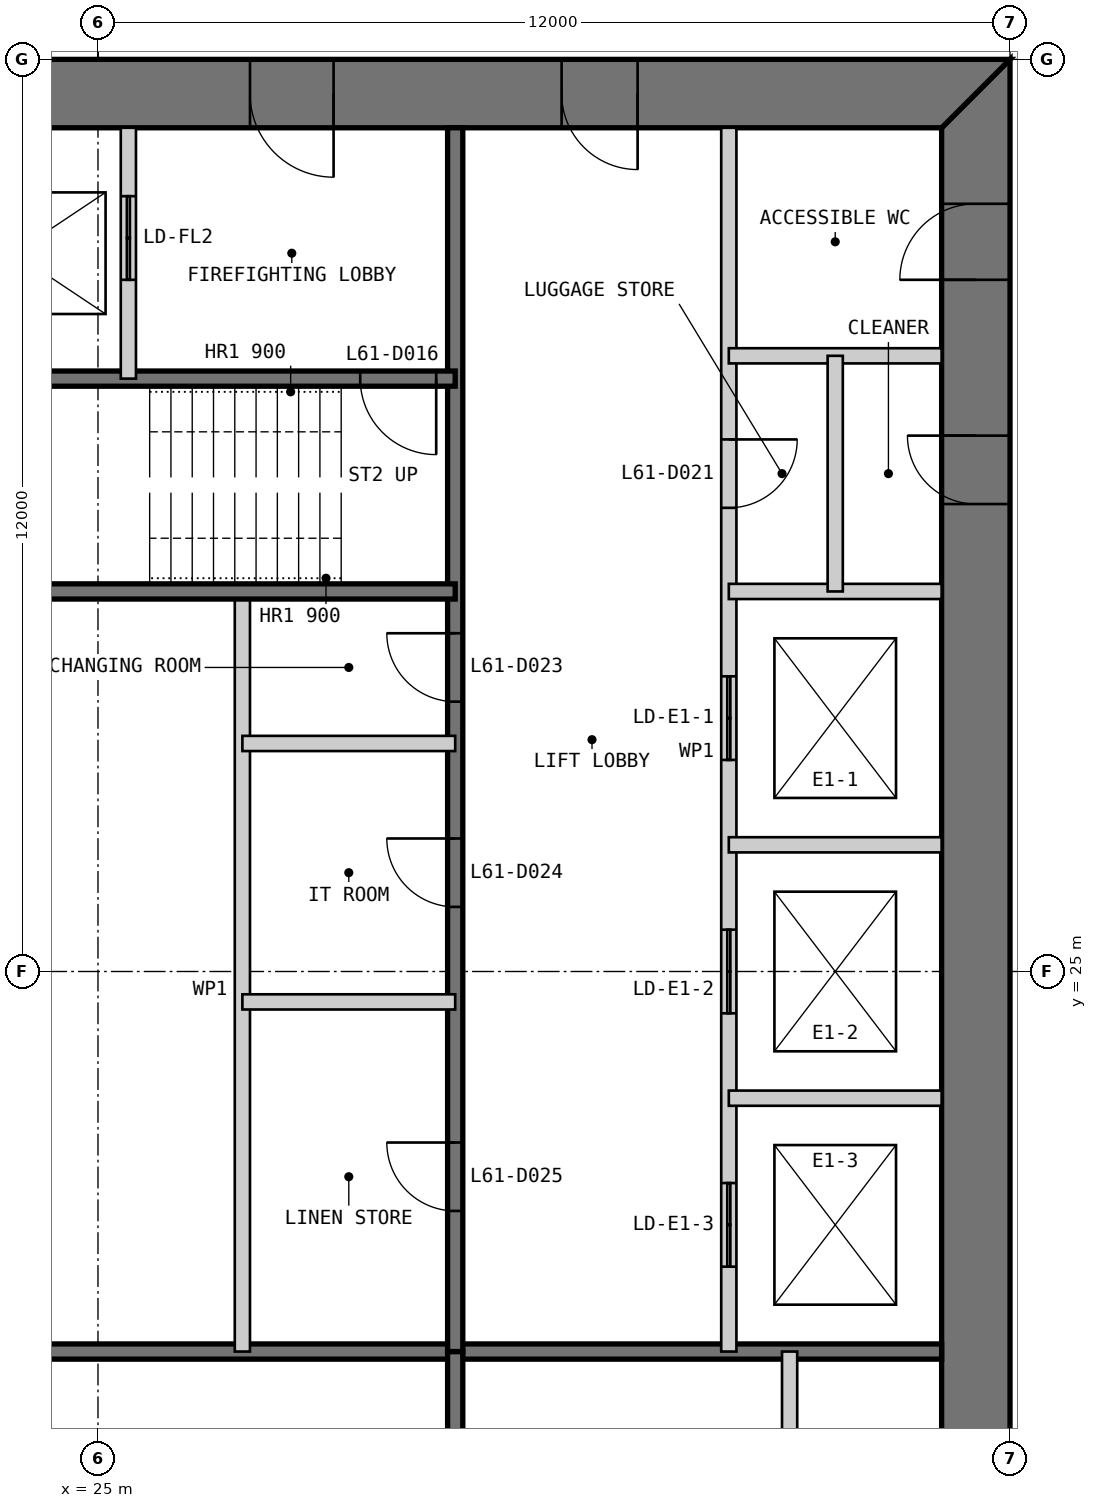
"""IFC4 building model, lengths in metres.
Left out: names, types, materials, properties, quantities, classifications, styles, units other than length and angle.
Written with IfcOpenShell. Run it as: python <this file> out.ifc"""

import sys

from ifc_helpers import new_model, si_unit, direction, frame, frame_2d, origin, place, context, subcontext, project, spatial, polyline, rectangle, outline, extrude, element, fill, save


model = new_model("IFC4")
c1 = context("Model", 3, precision=1e-05, world=origin(), true_north=direction((0.0, 1.0)))
c2 = subcontext(c1, "Body", "Model", "MODEL_VIEW")
j1 = project(units=[si_unit("LENGTHUNIT", "METRE"), si_unit("PLANEANGLEUNIT", "RADIAN")], contexts=[c1])
p1 = place(None, origin())
s1 = spatial("IfcSite", under=j1, at=p1, CompositionType="ELEMENT")
p2 = place(p1, origin())
s2 = spatial("IfcBuilding", under=s1, at=p2, CompositionType="ELEMENT")
p3 = place(p2, frame((0.0, 0.0, 259.4)))
s3 = spatial("IfcBuildingStorey", under=s2, at=p3, CompositionType="ELEMENT", Elevation=259.4)
p4 = place(p3, frame((36.55, 13.9, 0.0), z_axis=(0.0, 0.0, 1.0), x_axis=(0.0, 1.0, 0.0)))
e1 = element("IfcWall", 1, at=p4, inside=s3, PredefinedType="SHEAR", context=c2, shape_type="SweptSolid", body=[
    extrude(outline(polyline([(-0.9, -0.45), (23.1, -0.45), (22.2, 0.45), (0.0, 0.45), (-0.9, -0.45)])), origin(), (0.0, 0.0, 1.0), 3.4),
])
p5 = place(p4, frame((20.2, 0.0, 0.0)))
e2 = element("IfcOpeningElement", 2, at=p5, cuts=e1, PredefinedType="OPENING", context=c2, shape_type="SweptSolid", body=[
    extrude(rectangle(XDim=1.0, YDim=2.2, at=frame_2d((0.5, 1.1))), frame((0.0, 0.46, 0.0), z_axis=(0.0, -1.0, 0.0), x_axis=(1.0, 0.0, 0.0)), (0.0, 0.0, 1.0), 0.92),
])
p6 = place(p4, frame((17.25, 0.0, 0.0)))
e3 = element("IfcOpeningElement", 3, at=p6, cuts=e1, PredefinedType="OPENING", context=c2, shape_type="SweptSolid", body=[
    extrude(rectangle(XDim=0.9, YDim=2.2, at=frame_2d((0.45, 1.1))), frame((0.0, 0.46, 0.0), z_axis=(0.0, -1.0, 0.0), x_axis=(1.0, 0.0, 0.0)), (0.0, 0.0, 1.0), 0.92),
])
p7 = place(p3, frame((37.0, 36.55, 0.0), z_axis=(0.0, 0.0, 1.0), x_axis=(-1.0, 0.0, 0.0)))
e4 = element("IfcWall", 4, at=p7, inside=s3, PredefinedType="SHEAR", context=c2, shape_type="SweptSolid", body=[
    extrude(outline(polyline([(0.0, -0.45), (24.0, -0.45), (23.1, 0.45), (0.9, 0.45), (0.0, -0.45)])), origin(), (0.0, 0.0, 1.0), 3.4),
])
p8 = place(p7, frame((4.9, 0.0, 0.0)))
e5 = element("IfcOpeningElement", 5, at=p8, cuts=e4, PredefinedType="OPENING", context=c2, shape_type="SweptSolid", body=[
    extrude(rectangle(XDim=1.0, YDim=2.2, at=frame_2d((0.5, 1.1))), frame((0.0, 0.46, 0.0), z_axis=(0.0, -1.0, 0.0), x_axis=(1.0, 0.0, 0.0)), (0.0, 0.0, 1.0), 0.92),
])
p9 = place(p7, frame((8.9, 0.0, 0.0)))
e6 = element("IfcOpeningElement", 6, at=p9, cuts=e4, PredefinedType="OPENING", context=c2, shape_type="SweptSolid", body=[
    extrude(rectangle(XDim=1.1, YDim=2.2, at=frame_2d((0.55, 1.1))), frame((0.0, 0.46, 0.0), z_axis=(0.0, -1.0, 0.0), x_axis=(1.0, 0.0, 0.0)), (0.0, 0.0, 1.0), 0.92),
])
p10 = place(p7, frame((15.05, 0.0, 0.0)))
e7 = element("IfcOpeningElement", 7, at=p10, cuts=e4, PredefinedType="OPENING", context=c2, shape_type="SweptSolid", body=[
    extrude(rectangle(XDim=0.9, YDim=2.2, at=frame_2d((0.45, 1.1))), frame((0.0, 0.46, 0.0), z_axis=(0.0, -1.0, 0.0), x_axis=(1.0, 0.0, 0.0)), (0.0, 0.0, 1.0), 0.92),
])
p11 = place(p7, frame((17.9, 0.0, 0.0)))
e8 = element("IfcOpeningElement", 8, at=p11, cuts=e4, PredefinedType="OPENING", context=c2, shape_type="SweptSolid", body=[
    extrude(rectangle(XDim=1.0, YDim=2.2, at=frame_2d((0.5, 1.1))), frame((0.0, 0.46, 0.0), z_axis=(0.0, -1.0, 0.0), x_axis=(1.0, 0.0, 0.0)), (0.0, 0.0, 1.0), 0.92),
])
p12 = place(p7, frame((21.4, 0.0, 0.0)))
e9 = element("IfcOpeningElement", 9, at=p12, cuts=e4, PredefinedType="OPENING", context=c2, shape_type="SweptSolid", body=[
    extrude(rectangle(XDim=1.0, YDim=2.2, at=frame_2d((0.5, 1.1))), frame((0.0, 0.46, 0.0), z_axis=(0.0, -1.0, 0.0), x_axis=(1.0, 0.0, 0.0)), (0.0, 0.0, 1.0), 0.92),
])
p13 = place(p3, frame((20.3, 20.0, 0.0), z_axis=(0.0, 0.0, 1.0), x_axis=(1.0, 0.0, 0.0)))
e10 = element("IfcWall", 10, at=p13, inside=s3, PredefinedType="SOLIDWALL", context=c2, shape_type="SweptSolid", body=[
    extrude(rectangle(XDim=15.8, YDim=0.2, at=frame_2d((7.9, 0.0))), origin(), (0.0, 0.0, 1.0), 3.2),
])
p14 = place(p3, frame((29.7, 13.9, 0.0), z_axis=(0.0, 0.0, 1.0), x_axis=(0.0, 1.0, 0.0)))
e11 = element("IfcWall", 11, at=p14, inside=s3, PredefinedType="SOLIDWALL", context=c2, shape_type="SweptSolid", body=[
    extrude(rectangle(XDim=6.1, YDim=0.2, at=frame_2d((3.05, 0.0))), origin(), (0.0, 0.0, 1.0), 3.2),
])
p15 = place(p3, frame((34.1, 13.9, 0.0), z_axis=(0.0, 0.0, 1.0), x_axis=(0.0, 1.0, 0.0)))
e12 = element("IfcWall", 12, at=p15, inside=s3, PredefinedType="PARTITIONING", context=c2, shape_type="SweptSolid", body=[
    extrude(rectangle(XDim=6.1, YDim=0.2, at=frame_2d((3.05, 0.0))), origin(), (0.0, 0.0, 1.0), 3.2),
])
p16 = place(p3, frame((33.3, 36.1, 0.0), z_axis=(0.0, 0.0, 1.0), x_axis=(0.0, -1.0, 0.0)))
e13 = element("IfcWall", 13, at=p16, inside=s3, PredefinedType="PARTITIONING", context=c2, shape_type="SweptSolid", body=[
    extrude(rectangle(XDim=16.1, YDim=0.2, at=frame_2d((8.05, 0.0))), origin(), (0.0, 0.0, 1.0), 3.2),
])
p17 = place(p16, frame((4.1, 0.0, 0.0)))
e14 = element("IfcOpeningElement", 14, at=p17, cuts=e13, PredefinedType="OPENING", context=c2, shape_type="SweptSolid", body=[
    extrude(rectangle(XDim=0.9, YDim=2.2, at=frame_2d((0.45, 1.1))), frame((0.0, 0.11, 0.0), z_axis=(0.0, -1.0, 0.0), x_axis=(1.0, 0.0, 0.0)), (0.0, 0.0, 1.0), 0.22),
])
p18 = place(p16, frame((7.217, 0.0, 0.0)))
e15 = element("IfcOpeningElement", 15, at=p18, cuts=e13, PredefinedType="OPENING", context=c2, shape_type="SweptSolid", body=[
    extrude(rectangle(XDim=1.1, YDim=2.2, at=frame_2d((0.55, 1.1))), frame((0.0, 0.11, 0.0), z_axis=(0.0, -1.0, 0.0), x_axis=(1.0, 0.0, 0.0)), (0.0, 0.0, 1.0), 0.22),
])
p19 = place(p16, frame((10.55, 0.0, 0.0)))
e16 = element("IfcOpeningElement", 16, at=p19, cuts=e13, PredefinedType="OPENING", context=c2, shape_type="SweptSolid", body=[
    extrude(rectangle(XDim=1.1, YDim=2.2, at=frame_2d((0.55, 1.1))), frame((0.0, 0.11, 0.0), z_axis=(0.0, -1.0, 0.0), x_axis=(1.0, 0.0, 0.0)), (0.0, 0.0, 1.0), 0.22),
])
p20 = place(p16, frame((13.883, 0.0, 0.0)))
e17 = element("IfcOpeningElement", 17, at=p20, cuts=e13, PredefinedType="OPENING", context=c2, shape_type="SweptSolid", body=[
    extrude(rectangle(XDim=1.1, YDim=2.2, at=frame_2d((0.55, 1.1))), frame((0.0, 0.11, 0.0), z_axis=(0.0, -1.0, 0.0), x_axis=(1.0, 0.0, 0.0)), (0.0, 0.0, 1.0), 0.22),
])
p21 = place(p3, frame((29.7, 36.1, 0.0), z_axis=(0.0, 0.0, 1.0), x_axis=(0.0, -1.0, 0.0)))
e18 = element("IfcWall", 18, at=p21, inside=s3, PredefinedType="SOLIDWALL", context=c2, shape_type="SweptSolid", body=[
    extrude(rectangle(XDim=16.1, YDim=0.2, at=frame_2d((8.05, 0.0))), origin(), (0.0, 0.0, 1.0), 3.2),
])
p22 = place(p21, frame((6.65, 0.0, 0.0)))
e19 = element("IfcOpeningElement", 19, at=p22, cuts=e18, PredefinedType="OPENING", context=c2, shape_type="SweptSolid", body=[
    extrude(rectangle(XDim=0.9, YDim=2.2, at=frame_2d((0.45, 1.1))), frame((0.0, 0.11, 0.0), z_axis=(0.0, -1.0, 0.0), x_axis=(1.0, 0.0, 0.0)), (0.0, 0.0, 1.0), 0.22),
])
p23 = place(p21, frame((9.35, 0.0, 0.0)))
e20 = element("IfcOpeningElement", 20, at=p23, cuts=e18, PredefinedType="OPENING", context=c2, shape_type="SweptSolid", body=[
    extrude(rectangle(XDim=0.9, YDim=2.2, at=frame_2d((0.45, 1.1))), frame((0.0, 0.11, 0.0), z_axis=(0.0, -1.0, 0.0), x_axis=(1.0, 0.0, 0.0)), (0.0, 0.0, 1.0), 0.22),
])
p24 = place(p21, frame((13.35, 0.0, 0.0)))
e21 = element("IfcOpeningElement", 21, at=p24, cuts=e18, PredefinedType="OPENING", context=c2, shape_type="SweptSolid", body=[
    extrude(rectangle(XDim=0.9, YDim=2.2, at=frame_2d((0.45, 1.1))), frame((0.0, 0.11, 0.0), z_axis=(0.0, -1.0, 0.0), x_axis=(1.0, 0.0, 0.0)), (0.0, 0.0, 1.0), 0.22),
])
for number, where, z_axis, x_axis in (
    (22, (36.1, 30.0, 0.0), (0.0, 0.0, 1.0), (-1.0, 0.0, 0.0)),
    (23, (36.1, 26.667, 0.0), (0.0, 0.0, 1.0), (-1.0, 0.0, 0.0)),
    (24, (36.1, 23.333, 0.0), (0.0, 0.0, 1.0), (-1.0, 0.0, 0.0)),
):
    element("IfcWall", number, at=place(p3, frame(where, z_axis=z_axis, x_axis=x_axis)), inside=s3, PredefinedType="PARTITIONING", context=c2, shape_type="SweptSolid", body=[
        extrude(rectangle(XDim=2.8, YDim=0.2, at=frame_2d((1.4, 0.0))), origin(), (0.0, 0.0, 1.0), 3.2),
    ])
p25 = place(p3, frame((26.9, 30.0, 0.0), z_axis=(0.0, 0.0, 1.0), x_axis=(0.0, -1.0, 0.0)))
e25 = element("IfcWall", 25, at=p25, inside=s3, PredefinedType="PARTITIONING", context=c2, shape_type="SweptSolid", body=[
    extrude(rectangle(XDim=10.0, YDim=0.2, at=frame_2d((5.0, 0.0))), origin(), (0.0, 0.0, 1.0), 3.2),
])
p26 = place(p3, frame((29.7, 32.8, 0.0), z_axis=(0.0, 0.0, 1.0), x_axis=(-1.0, 0.0, 0.0)))
e26 = element("IfcWall", 26, at=p26, inside=s3, PredefinedType="SOLIDWALL", context=c2, shape_type="SweptSolid", body=[
    extrude(rectangle(XDim=9.4, YDim=0.2, at=frame_2d((4.7, 0.0))), origin(), (0.0, 0.0, 1.0), 3.2),
])
p27 = place(p26, frame((0.25, 0.0, 0.0)))
e27 = element("IfcOpeningElement", 27, at=p27, cuts=e26, PredefinedType="OPENING", context=c2, shape_type="SweptSolid", body=[
    extrude(rectangle(XDim=1.0, YDim=2.2, at=frame_2d((0.5, 1.1))), frame((0.0, 0.11, 0.0), z_axis=(0.0, -1.0, 0.0), x_axis=(1.0, 0.0, 0.0)), (0.0, 0.0, 1.0), 0.22),
])
p28 = place(p3, frame((29.7, 30.0, 0.0), z_axis=(0.0, 0.0, 1.0), x_axis=(-1.0, 0.0, 0.0)))
e28 = element("IfcWall", 28, at=p28, inside=s3, PredefinedType="SOLIDWALL", context=c2, shape_type="SweptSolid", body=[
    extrude(rectangle(XDim=15.8, YDim=0.2, at=frame_2d((7.9, 0.0))), origin(), (0.0, 0.0, 1.0), 3.2),
])
p29 = place(p3, frame((25.4, 36.1, 0.0), z_axis=(0.0, 0.0, 1.0), x_axis=(0.0, -1.0, 0.0)))
e29 = element("IfcWall", 29, at=p29, inside=s3, PredefinedType="PARTITIONING", context=c2, shape_type="SweptSolid", body=[
    extrude(rectangle(XDim=3.3, YDim=0.2, at=frame_2d((1.65, 0.0))), origin(), (0.0, 0.0, 1.0), 3.2),
])
p30 = place(p29, frame((0.9, 0.0, 0.0)))
e30 = element("IfcOpeningElement", 30, at=p30, cuts=e29, PredefinedType="OPENING", context=c2, shape_type="SweptSolid", body=[
    extrude(rectangle(XDim=1.1, YDim=2.2, at=frame_2d((0.55, 1.1))), frame((0.0, 0.11, 0.0), z_axis=(0.0, -1.0, 0.0), x_axis=(1.0, 0.0, 0.0)), (0.0, 0.0, 1.0), 0.22),
])
p31 = place(p3, frame((36.1, 33.1, 0.0), z_axis=(0.0, 0.0, 1.0), x_axis=(-1.0, 0.0, 0.0)))
e31 = element("IfcWall", 31, at=p31, inside=s3, PredefinedType="PARTITIONING", context=c2, shape_type="SweptSolid", body=[
    extrude(rectangle(XDim=2.8, YDim=0.2, at=frame_2d((1.4, 0.0))), origin(), (0.0, 0.0, 1.0), 3.2),
])
p32 = place(p3, frame((34.7, 33.1, 0.0), z_axis=(0.0, 0.0, 1.0), x_axis=(0.0, -1.0, 0.0)))
e32 = element("IfcWall", 32, at=p32, inside=s3, PredefinedType="PARTITIONING", context=c2, shape_type="SweptSolid", body=[
    extrude(rectangle(XDim=3.1, YDim=0.2, at=frame_2d((1.55, 0.0))), origin(), (0.0, 0.0, 1.0), 3.2),
])
for number, where, z_axis, x_axis in (
    (33, (29.7, 28.0, 0.0), (0.0, 0.0, 1.0), (-1.0, 0.0, 0.0)),
    (34, (29.7, 24.6, 0.0), (0.0, 0.0, 1.0), (-1.0, 0.0, 0.0)),
):
    element("IfcWall", number, at=place(p3, frame(where, z_axis=z_axis, x_axis=x_axis)), inside=s3, PredefinedType="PARTITIONING", context=c2, shape_type="SweptSolid", body=[
        extrude(rectangle(XDim=2.8, YDim=0.2, at=frame_2d((1.4, 0.0))), origin(), (0.0, 0.0, 1.0), 3.2),
    ])
p33 = place(p8, origin())
e35 = element("IfcDoor", 35, at=p33, inside=s3, OperationType="SINGLE_SWING_LEFT", PredefinedType="DOOR", context=c2, shape_type="SweptSolid", body=[
    extrude(rectangle(XDim=1.0, YDim=2.2, at=frame_2d((0.5, 1.1))), frame((0.0, 0.025, 0.0), z_axis=(0.0, -1.0, 0.0), x_axis=(1.0, 0.0, 0.0)), (0.0, 0.0, 1.0), 0.05),
    extrude(outline(polyline([(0.0, 0.0), (0.04, 0.0), (0.04, 2.16), (0.96, 2.16), (0.96, 0.0), (1.0, 0.0), (1.0, 2.2), (0.0, 2.2), (0.0, 0.0)])), frame((0.0, 0.3, 0.0), z_axis=(0.0, -1.0, 0.0), x_axis=(1.0, 0.0, 0.0)), (0.0, 0.0, 1.0), 0.6),
])
fill(e5, e35)
p34 = place(p9, origin())
e36 = element("IfcDoor", 36, at=p34, inside=s3, OperationType="SINGLE_SWING_LEFT", PredefinedType="DOOR", context=c2, shape_type="SweptSolid", body=[
    extrude(rectangle(XDim=1.1, YDim=2.2, at=frame_2d((0.55, 1.1))), frame((0.0, 0.025, 0.0), z_axis=(0.0, -1.0, 0.0), x_axis=(1.0, 0.0, 0.0)), (0.0, 0.0, 1.0), 0.05),
    extrude(outline(polyline([(0.0, 0.0), (0.04, 0.0), (0.04, 2.16), (1.06, 2.16), (1.06, 0.0), (1.1, 0.0), (1.1, 2.2), (0.0, 2.2), (0.0, 0.0)])), frame((0.0, 0.3, 0.0), z_axis=(0.0, -1.0, 0.0), x_axis=(1.0, 0.0, 0.0)), (0.0, 0.0, 1.0), 0.6),
])
fill(e6, e36)
p35 = place(p27, origin())
e37 = element("IfcDoor", 37, at=p35, inside=s3, OperationType="SINGLE_SWING_LEFT", PredefinedType="DOOR", context=c2, shape_type="SweptSolid", body=[
    extrude(rectangle(XDim=1.0, YDim=2.2, at=frame_2d((0.5, 1.1))), frame((0.0, 0.025, 0.0), z_axis=(0.0, -1.0, 0.0), x_axis=(1.0, 0.0, 0.0)), (0.0, 0.0, 1.0), 0.05),
])
fill(e27, e37)
p36 = place(p5, origin())
e38 = element("IfcDoor", 38, at=p36, inside=s3, OperationType="SINGLE_SWING_LEFT", PredefinedType="DOOR", context=c2, shape_type="SweptSolid", body=[
    extrude(rectangle(XDim=1.0, YDim=2.2, at=frame_2d((0.5, 1.1))), frame((0.0, 0.025, 0.0), z_axis=(0.0, -1.0, 0.0), x_axis=(1.0, 0.0, 0.0)), (0.0, 0.0, 1.0), 0.05),
    extrude(outline(polyline([(0.0, 0.0), (0.04, 0.0), (0.04, 2.16), (0.96, 2.16), (0.96, 0.0), (1.0, 0.0), (1.0, 2.2), (0.0, 2.2), (0.0, 0.0)])), frame((0.0, 0.3, 0.0), z_axis=(0.0, -1.0, 0.0), x_axis=(1.0, 0.0, 0.0)), (0.0, 0.0, 1.0), 0.6),
])
fill(e2, e38)
p37 = place(p17, origin())
e39 = element("IfcDoor", 39, at=p37, inside=s3, OperationType="SINGLE_SWING_LEFT", PredefinedType="DOOR", context=c2, shape_type="SweptSolid", body=[
    extrude(rectangle(XDim=0.9, YDim=2.2, at=frame_2d((0.45, 1.1))), frame((0.0, 0.025, 0.0), z_axis=(0.0, -1.0, 0.0), x_axis=(1.0, 0.0, 0.0)), (0.0, 0.0, 1.0), 0.05),
])
fill(e14, e39)
p38 = place(p6, origin())
e40 = element("IfcDoor", 40, at=p38, inside=s3, OperationType="SINGLE_SWING_RIGHT", PredefinedType="DOOR", context=c2, shape_type="SweptSolid", body=[
    extrude(rectangle(XDim=0.9, YDim=2.2, at=frame_2d((0.45, 1.1))), frame((0.0, 0.025, 0.0), z_axis=(0.0, -1.0, 0.0), x_axis=(1.0, 0.0, 0.0)), (0.0, 0.0, 1.0), 0.05),
    extrude(outline(polyline([(0.0, 0.0), (0.04, 0.0), (0.04, 2.16), (0.86, 2.16), (0.86, 0.0), (0.9, 0.0), (0.9, 2.2), (0.0, 2.2), (0.0, 0.0)])), frame((0.0, 0.3, 0.0), z_axis=(0.0, -1.0, 0.0), x_axis=(1.0, 0.0, 0.0)), (0.0, 0.0, 1.0), 0.6),
])
fill(e3, e40)
p39 = place(p22, frame((0.9, 0.0, 0.0), z_axis=(0.0, 0.0, 1.0), x_axis=(-1.0, 0.0, 0.0)))
e41 = element("IfcDoor", 41, at=p39, inside=s3, OperationType="SINGLE_SWING_RIGHT", PredefinedType="DOOR", context=c2, shape_type="SweptSolid", body=[
    extrude(rectangle(XDim=0.9, YDim=2.2, at=frame_2d((0.45, 1.1))), frame((0.0, 0.025, 0.0), z_axis=(0.0, -1.0, 0.0), x_axis=(1.0, 0.0, 0.0)), (0.0, 0.0, 1.0), 0.05),
])
fill(e19, e41)
p40 = place(p23, frame((0.9, 0.0, 0.0), z_axis=(0.0, 0.0, 1.0), x_axis=(-1.0, 0.0, 0.0)))
e42 = element("IfcDoor", 42, at=p40, inside=s3, OperationType="SINGLE_SWING_RIGHT", PredefinedType="DOOR", context=c2, shape_type="SweptSolid", body=[
    extrude(rectangle(XDim=0.9, YDim=2.2, at=frame_2d((0.45, 1.1))), frame((0.0, 0.025, 0.0), z_axis=(0.0, -1.0, 0.0), x_axis=(1.0, 0.0, 0.0)), (0.0, 0.0, 1.0), 0.05),
])
fill(e20, e42)
p41 = place(p24, frame((0.9, 0.0, 0.0), z_axis=(0.0, 0.0, 1.0), x_axis=(-1.0, 0.0, 0.0)))
e43 = element("IfcDoor", 43, at=p41, inside=s3, OperationType="SINGLE_SWING_RIGHT", PredefinedType="DOOR", context=c2, shape_type="SweptSolid", body=[
    extrude(rectangle(XDim=0.9, YDim=2.2, at=frame_2d((0.45, 1.1))), frame((0.0, 0.025, 0.0), z_axis=(0.0, -1.0, 0.0), x_axis=(1.0, 0.0, 0.0)), (0.0, 0.0, 1.0), 0.05),
])
fill(e21, e43)
p42 = place(p30, origin())
e44 = element("IfcDoor", 44, at=p42, inside=s3, OperationType="DOUBLE_DOOR_SLIDING", PredefinedType="DOOR", context=c2, shape_type="SweptSolid", body=[
    extrude(rectangle(XDim=1.1, YDim=2.2, at=frame_2d((0.55, 1.1))), frame((0.0, 0.025, 0.0), z_axis=(0.0, -1.0, 0.0), x_axis=(1.0, 0.0, 0.0)), (0.0, 0.0, 1.0), 0.05),
])
fill(e30, e44)
p43 = place(p18, origin())
e45 = element("IfcDoor", 45, at=p43, inside=s3, OperationType="DOUBLE_DOOR_SLIDING", PredefinedType="DOOR", context=c2, shape_type="SweptSolid", body=[
    extrude(rectangle(XDim=1.1, YDim=2.2, at=frame_2d((0.55, 1.1))), frame((0.0, 0.025, 0.0), z_axis=(0.0, -1.0, 0.0), x_axis=(1.0, 0.0, 0.0)), (0.0, 0.0, 1.0), 0.05),
])
fill(e15, e45)
p44 = place(p19, origin())
e46 = element("IfcDoor", 46, at=p44, inside=s3, OperationType="DOUBLE_DOOR_SLIDING", PredefinedType="DOOR", context=c2, shape_type="SweptSolid", body=[
    extrude(rectangle(XDim=1.1, YDim=2.2, at=frame_2d((0.55, 1.1))), frame((0.0, 0.025, 0.0), z_axis=(0.0, -1.0, 0.0), x_axis=(1.0, 0.0, 0.0)), (0.0, 0.0, 1.0), 0.05),
])
fill(e16, e46)
p45 = place(p20, origin())
e47 = element("IfcDoor", 47, at=p45, inside=s3, OperationType="DOUBLE_DOOR_SLIDING", PredefinedType="DOOR", context=c2, shape_type="SweptSolid", body=[
    extrude(rectangle(XDim=1.1, YDim=2.2, at=frame_2d((0.55, 1.1))), frame((0.0, 0.025, 0.0), z_axis=(0.0, -1.0, 0.0), x_axis=(1.0, 0.0, 0.0)), (0.0, 0.0, 1.0), 0.05),
])
fill(e17, e47)
save(model, sys.argv[1])
